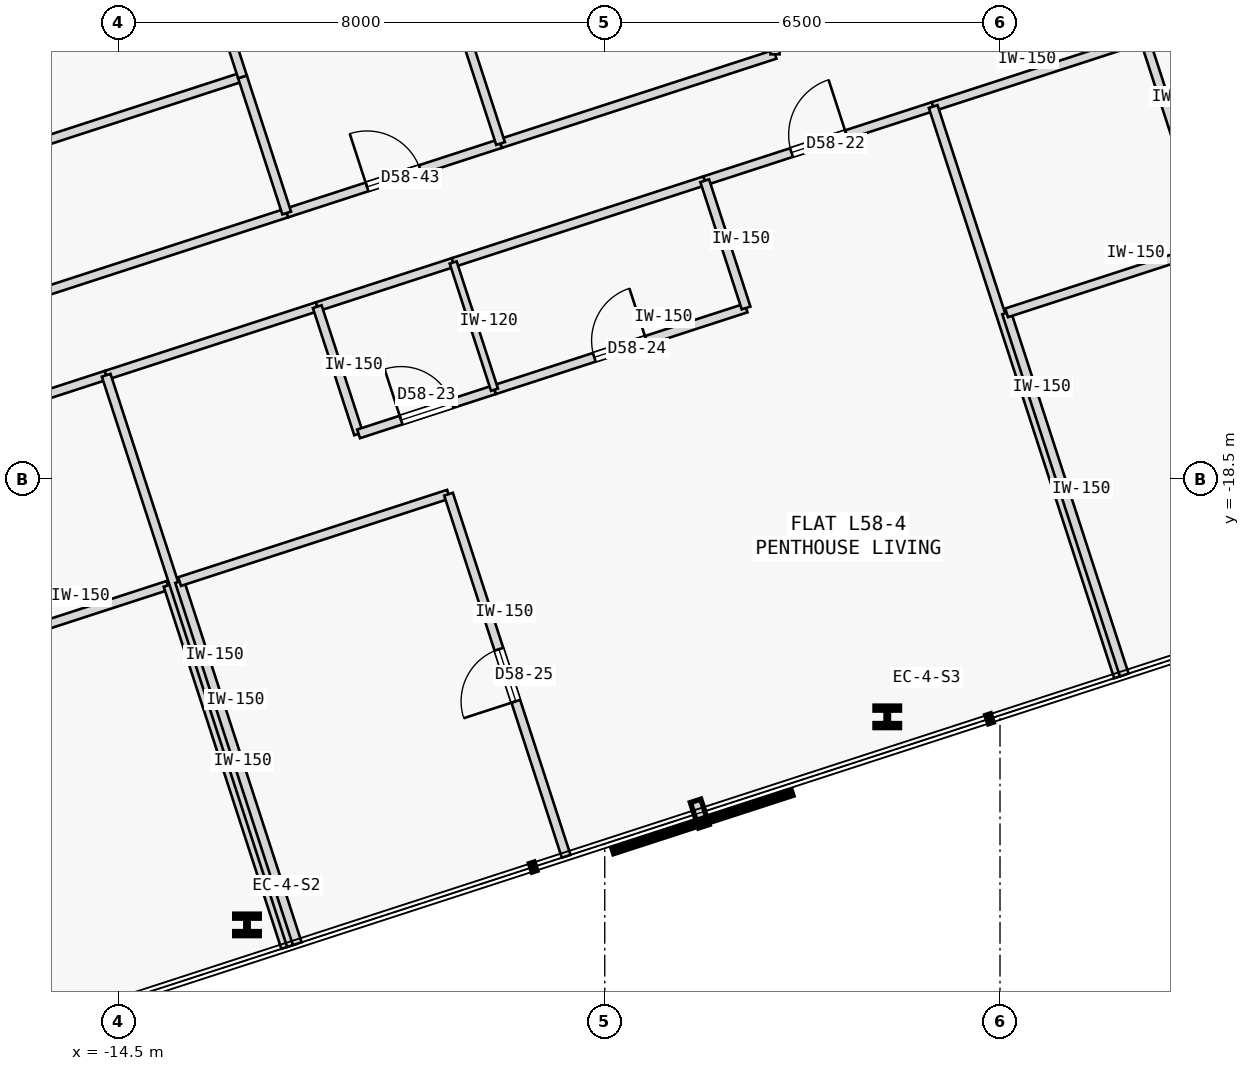
"""IFC4 building model, lengths in metres.
Left out: names, types, materials, properties, quantities, classifications, styles, units other than length and angle.
Written with IfcOpenShell. Run it as: python <this file> out.ifc"""

import sys

from ifc_helpers import new_model, si_unit, direction, frame, frame_2d, origin, origin_2d, place, context, subcontext, project, spatial, rectangle, i_section, extrude, element, fill, save


model = new_model("IFC4")
c1 = context("Model", 3, precision=1e-05, world=origin(), true_north=direction((0.0, 1.0)))
c2 = subcontext(c1, "Body", "Model", "MODEL_VIEW")
j1 = project(units=[si_unit("LENGTHUNIT", "METRE"), si_unit("PLANEANGLEUNIT", "RADIAN")], contexts=[c1])
p1 = place(None, origin())
s1 = spatial("IfcSite", under=j1, at=p1, CompositionType="ELEMENT")
p2 = place(p1, origin())
s2 = spatial("IfcBuilding", under=s1, at=p2, CompositionType="ELEMENT")
p3 = place(p2, frame((0.0, 0.0, 220.95)))
s3 = spatial("IfcBuildingStorey", under=s2, at=p3, CompositionType="ELEMENT", Elevation=220.95)
for number, where, z_axis, x_axis in (
    (1, (-12.384, -25.83, 0.0), (0.0, 0.0, 1.0), (1.0, 0.0, 0.0)),
    (2, (-1.854, -22.409, 0.0), (0.0, 0.0, 1.0), (1.0, 0.0, 0.0)),
):
    element("IfcColumn", number, at=place(p3, frame(where, z_axis=z_axis, x_axis=x_axis)), inside=s3, PredefinedType="COLUMN", context=c2, shape_type="SweptSolid", body=[
        extrude(i_section(OverallWidth=0.405, OverallDepth=0.355, WebThickness=0.042, FlangeThickness=0.068, FilletRadius=0.015, at=origin_2d()), origin(), (0.0, 0.0, 1.0), 3.35),
    ])
p4 = place(p3, frame((-18.992, -18.186, 0.0), z_axis=(0.0, 0.0, 1.0), x_axis=(0.951067846467, 0.308982121516, 0.0)))
e3 = element("IfcWall", 3, at=p4, inside=s3, PredefinedType="PARTITIONING", context=c2, shape_type="SweptSolid", body=[
    extrude(rectangle(XDim=4.514, YDim=0.15, at=frame_2d((2.257, 0.0))), origin(), (0.0, 0.0, 1.0), 3.125),
])
p5 = place(p4, frame((1.782, 0.0, 0.0)))
e4 = element("IfcOpeningElement", 4, at=p5, cuts=e3, PredefinedType="OPENING", context=c2, shape_type="SweptSolid", body=[
    extrude(rectangle(XDim=0.95, YDim=2.15, at=frame_2d((0.475, 1.075))), frame((0.0, 0.085, 0.0), z_axis=(0.0, -1.0, 0.0), x_axis=(1.0, 0.0, 0.0)), (0.0, 0.0, 1.0), 0.17),
])
p6 = place(p3, frame((-14.699, -16.791, 0.0), z_axis=(0.0, 0.0, 1.0), x_axis=(0.951050780541, 0.309034646652, 0.0)))
e5 = element("IfcWall", 5, at=p6, inside=s3, PredefinedType="PARTITIONING", context=c2, shape_type="SweptSolid", body=[
    extrude(rectangle(XDim=3.65, YDim=0.15, at=frame_2d((1.825, 0.0))), origin(), (0.0, 0.0, 1.0), 3.125),
])
p7 = place(p3, frame((-4.856, -13.593, 0.0), z_axis=(0.0, 0.0, 1.0), x_axis=(0.951054051148, 0.309024581215, 0.0)))
e6 = element("IfcWall", 6, at=p7, inside=s3, PredefinedType="PARTITIONING", context=c2, shape_type="SweptSolid", body=[
    extrude(rectangle(XDim=3.95, YDim=0.15, at=frame_2d((1.975, 0.0))), origin(), (0.0, 0.0, 1.0), 3.125),
])
p8 = place(p7, frame((1.5, 0.0, 0.0)))
e7 = element("IfcOpeningElement", 7, at=p8, cuts=e6, PredefinedType="OPENING", context=c2, shape_type="SweptSolid", body=[
    extrude(rectangle(XDim=0.95, YDim=2.15, at=frame_2d((0.475, 1.075))), frame((0.0, 0.085, 0.0), z_axis=(0.0, -1.0, 0.0), x_axis=(1.0, 0.0, 0.0)), (0.0, 0.0, 1.0), 0.17),
])
p9 = place(p3, frame((-11.228, -15.663, 0.0), z_axis=(0.0, 0.0, 1.0), x_axis=(0.951076048914, 0.308956872689, 0.0)))
e8 = element("IfcWall", 8, at=p9, inside=s3, PredefinedType="PARTITIONING", context=c2, shape_type="SweptSolid", body=[
    extrude(rectangle(XDim=2.35, YDim=0.15, at=frame_2d((1.175, 0.0))), origin(), (0.0, 0.0, 1.0), 3.125),
])
p10 = place(p3, frame((-8.993, -14.937, 0.0), z_axis=(0.0, 0.0, 1.0), x_axis=(0.951052627573, 0.309028962374, 0.0)))
e9 = element("IfcWall", 9, at=p10, inside=s3, PredefinedType="PARTITIONING", context=c2, shape_type="SweptSolid", body=[
    extrude(rectangle(XDim=4.35, YDim=0.15, at=frame_2d((2.175, 0.0))), origin(), (0.0, 0.0, 1.0), 3.125),
])
p11 = place(p3, frame((-1.099, -12.372, 0.0), z_axis=(0.0, 0.0, 1.0), x_axis=(0.951057168147, 0.309014988174, 0.0)))
e10 = element("IfcWall", 10, at=p11, inside=s3, PredefinedType="PARTITIONING", context=c2, shape_type="SweptSolid", body=[
    extrude(rectangle(XDim=3.65, YDim=0.15, at=frame_2d((1.825, 0.0))), origin(), (0.0, 0.0, 1.0), 3.125),
])
p12 = place(p3, frame((-29.45, -19.881, 0.0), z_axis=(0.0, 0.0, 1.0), x_axis=(0.95105650271, 0.309017036186, 0.0)))
e11 = element("IfcWall", 11, at=p12, inside=s3, PredefinedType="PARTITIONING", context=c2, shape_type="SweptSolid", body=[
    extrude(rectangle(XDim=18.632, YDim=0.15, at=frame_2d((9.316, 0.0))), origin(), (0.0, 0.0, 1.0), 3.125),
])
p13 = place(p12, frame((8.856, 0.0, 0.0)))
e12 = element("IfcOpeningElement", 12, at=p13, cuts=e11, PredefinedType="OPENING", context=c2, shape_type="SweptSolid", body=[
    extrude(rectangle(XDim=0.92, YDim=2.15, at=frame_2d((0.46, 1.075))), frame((0.0, 0.085, 0.0), z_axis=(0.0, -1.0, 0.0), x_axis=(1.0, 0.0, 0.0)), (0.0, 0.0, 1.0), 0.17),
])
p14 = place(p3, frame((-11.73, -14.123, 0.0), z_axis=(0.0, 0.0, 1.0), x_axis=(0.951052502763, 0.309029346483, 0.0)))
e13 = element("IfcWall", 13, at=p14, inside=s3, PredefinedType="PARTITIONING", context=c2, shape_type="SweptSolid", body=[
    extrude(rectangle(XDim=3.698, YDim=0.15, at=frame_2d((1.849, 0.0))), origin(), (0.0, 0.0, 1.0), 3.125),
])
p15 = place(p14, frame((1.389, 0.0, 0.0)))
e14 = element("IfcOpeningElement", 14, at=p15, cuts=e13, PredefinedType="OPENING", context=c2, shape_type="SweptSolid", body=[
    extrude(rectangle(XDim=0.92, YDim=2.15, at=frame_2d((0.46, 1.075))), frame((0.0, 0.085, 0.0), z_axis=(0.0, -1.0, 0.0), x_axis=(1.0, 0.0, 0.0)), (0.0, 0.0, 1.0), 0.17),
])
p16 = place(p3, frame((-8.213, -12.98, 0.0), z_axis=(0.0, 0.0, 1.0), x_axis=(0.951058260096, 0.309011627456, 0.0)))
e15 = element("IfcWall", 15, at=p16, inside=s3, PredefinedType="PARTITIONING", context=c2, shape_type="SweptSolid", body=[
    extrude(rectangle(XDim=4.746, YDim=0.15, at=frame_2d((2.373, 0.0))), origin(), (0.0, 0.0, 1.0), 3.125),
])
p17 = place(p3, frame((-3.7, -11.514, 0.0), z_axis=(0.0, 0.0, 1.0), x_axis=(-8.2572974e-05, 0.999999996591, 0.0)))
e16 = element("IfcWall", 16, at=p17, inside=s3, PredefinedType="PARTITIONING", context=c2, shape_type="SweptSolid", body=[
    extrude(rectangle(XDim=5.913, YDim=0.15, at=frame_2d((2.957, 0.0))), origin(), (0.0, 0.0, 1.0), 3.125),
])
p18 = place(p17, frame((2.497, 0.0, 0.0)))
e17 = element("IfcOpeningElement", 17, at=p18, cuts=e16, PredefinedType="OPENING", context=c2, shape_type="SweptSolid", body=[
    extrude(rectangle(XDim=0.92, YDim=2.15, at=frame_2d((0.46, 1.075))), frame((0.0, 0.085, 0.0), z_axis=(0.0, -1.0, 0.0), x_axis=(1.0, 0.0, 0.0)), (0.0, 0.0, 1.0), 0.17),
])
p19 = place(p3, frame((-18.104, -21.683, 0.0), z_axis=(0.0, 0.0, 1.0), x_axis=(0.951055286502, 0.309020779263, 0.0)))
e18 = element("IfcWall", 18, at=p19, inside=s3, PredefinedType="PARTITIONING", context=c2, shape_type="SweptSolid", body=[
    extrude(rectangle(XDim=4.65, YDim=0.15, at=frame_2d((2.325, 0.0))), origin(), (0.0, 0.0, 1.0), 3.125),
])
p20 = place(p3, frame((-11.747, -26.201, 0.0), z_axis=(0.0, 0.0, 1.0), x_axis=(-0.309013782848, 0.951057559777, 0.0)))
e19 = element("IfcWall", 19, at=p20, inside=s3, PredefinedType="PARTITIONING", context=c2, shape_type="SweptSolid", body=[
    extrude(rectangle(XDim=6.262, YDim=0.15, at=frame_2d((3.131, 0.0))), origin(), (0.0, 0.0, 1.0), 3.125),
])
p21 = place(p3, frame((-11.652, -26.17, 0.0), z_axis=(0.0, 0.0, 1.0), x_axis=(-0.308999867152, 0.951062081097, 0.0)))
e20 = element("IfcWall", 20, at=p21, inside=s3, PredefinedType="PARTITIONING", context=c2, shape_type="SweptSolid", body=[
    extrude(rectangle(XDim=9.862, YDim=0.15, at=frame_2d((4.931, 0.0))), origin(), (0.0, 0.0, 1.0), 3.125),
])
p22 = place(p3, frame((-10.548, -17.755, 0.0), z_axis=(0.0, 0.0, 1.0), x_axis=(-0.309060979314, 0.951042223598, 0.0)))
e21 = element("IfcWall", 21, at=p22, inside=s3, PredefinedType="PARTITIONING", context=c2, shape_type="SweptSolid", body=[
    extrude(rectangle(XDim=2.2, YDim=0.15, at=frame_2d((1.1, 0.0))), origin(), (0.0, 0.0, 1.0), 3.125),
])
p23 = place(p3, frame((-10.548, -17.755, 0.0), z_axis=(0.0, 0.0, 1.0), x_axis=(0.951076048914, 0.308956872689, 0.0)))
e22 = element("IfcWall", 22, at=p23, inside=s3, PredefinedType="PARTITIONING", context=c2, shape_type="SweptSolid", body=[
    extrude(rectangle(XDim=2.35, YDim=0.15, at=frame_2d((1.175, 0.0))), origin(), (0.0, 0.0, 1.0), 3.125),
])
p24 = place(p23, frame((0.735, 0.0, 0.0)))
e23 = element("IfcOpeningElement", 23, at=p24, cuts=e22, PredefinedType="OPENING", context=c2, shape_type="SweptSolid", body=[
    extrude(rectangle(XDim=0.88, YDim=2.15, at=frame_2d((0.44, 1.075))), frame((0.0, 0.085, 0.0), z_axis=(0.0, -1.0, 0.0), x_axis=(1.0, 0.0, 0.0)), (0.0, 0.0, 1.0), 0.17),
])
p25 = place(p3, frame((-8.313, -17.029, 0.0), z_axis=(0.0, 0.0, 1.0), x_axis=(0.951052627573, 0.309028962374, 0.0)))
e24 = element("IfcWall", 24, at=p25, inside=s3, PredefinedType="PARTITIONING", context=c2, shape_type="SweptSolid", body=[
    extrude(rectangle(XDim=4.35, YDim=0.15, at=frame_2d((2.175, 0.0))), origin(), (0.0, 0.0, 1.0), 3.125),
])
p26 = place(p25, frame((1.725, 0.0, 0.0)))
e25 = element("IfcOpeningElement", 25, at=p26, cuts=e24, PredefinedType="OPENING", context=c2, shape_type="SweptSolid", body=[
    extrude(rectangle(XDim=0.9, YDim=2.15, at=frame_2d((0.45, 1.075))), frame((0.0, 0.085, 0.0), z_axis=(0.0, -1.0, 0.0), x_axis=(1.0, 0.0, 0.0)), (0.0, 0.0, 1.0), 0.17),
])
p27 = place(p3, frame((-4.176, -15.685, 0.0), z_axis=(0.0, 0.0, 1.0), x_axis=(-0.309060979314, 0.951042223598, 0.0)))
e26 = element("IfcWall", 26, at=p27, inside=s3, PredefinedType="PARTITIONING", context=c2, shape_type="SweptSolid", body=[
    extrude(rectangle(XDim=2.2, YDim=0.15, at=frame_2d((1.1, 0.0))), origin(), (0.0, 0.0, 1.0), 3.125),
])
p28 = place(p3, frame((-11.557, -26.139, 0.0), z_axis=(0.0, 0.0, 1.0), x_axis=(-0.309013782848, 0.951057559777, 0.0)))
e27 = element("IfcWall", 27, at=p28, inside=s3, PredefinedType="PARTITIONING", context=c2, shape_type="SweptSolid", body=[
    extrude(rectangle(XDim=6.262, YDim=0.15, at=frame_2d((3.131, 0.0))), origin(), (0.0, 0.0, 1.0), 3.125),
])
p29 = place(p3, frame((-13.492, -20.184, 0.0), z_axis=(0.0, 0.0, 1.0), x_axis=(0.951065702951, 0.308988719326, 0.0)))
e28 = element("IfcWall", 28, at=p29, inside=s3, PredefinedType="PARTITIONING", context=c2, shape_type="SweptSolid", body=[
    extrude(rectangle(XDim=4.65, YDim=0.15, at=frame_2d((2.325, 0.0))), origin(), (0.0, 0.0, 1.0), 3.125),
])
p30 = place(p3, frame((-7.134, -24.702, 0.0), z_axis=(0.0, 0.0, 1.0), x_axis=(-0.30902524124, 0.951053836687, 0.0)))
e29 = element("IfcWall", 29, at=p30, inside=s3, PredefinedType="PARTITIONING", context=c2, shape_type="SweptSolid", body=[
    extrude(rectangle(XDim=6.262, YDim=0.15, at=frame_2d((3.131, 0.0))), origin(), (0.0, 0.0, 1.0), 3.125),
])
p31 = place(p30, frame((2.681, 0.0, 0.0)))
e30 = element("IfcOpeningElement", 30, at=p31, cuts=e29, PredefinedType="OPENING", context=c2, shape_type="SweptSolid", body=[
    extrude(rectangle(XDim=0.9, YDim=2.15, at=frame_2d((0.45, 1.075))), frame((0.0, 0.085, 0.0), z_axis=(0.0, -1.0, 0.0), x_axis=(1.0, 0.0, 0.0)), (0.0, 0.0, 1.0), 0.17),
])
p32 = place(p3, frame((1.948, -21.751, 0.0), z_axis=(0.0, 0.0, 1.0), x_axis=(-0.308999867152, 0.951062081097, 0.0)))
e31 = element("IfcWall", 31, at=p32, inside=s3, PredefinedType="PARTITIONING", context=c2, shape_type="SweptSolid", body=[
    extrude(rectangle(XDim=9.862, YDim=0.15, at=frame_2d((4.931, 0.0))), origin(), (0.0, 0.0, 1.0), 3.125),
])
p33 = place(p3, frame((-8.313, -17.029, 0.0), z_axis=(0.0, 0.0, 1.0), x_axis=(-0.309060979314, 0.951042223598, 0.0)))
e32 = element("IfcWall", 32, at=p33, inside=s3, PredefinedType="PARTITIONING", context=c2, shape_type="SweptSolid", body=[
    extrude(rectangle(XDim=2.2, YDim=0.12, at=frame_2d((1.1, 0.0))), origin(), (0.0, 0.0, 1.0), 3.125),
])
p34 = place(p3, frame((3.052, -13.336, 0.0), z_axis=(0.0, 0.0, 1.0), x_axis=(-0.308960600764, 0.951074837842, 0.0)))
e33 = element("IfcWall", 33, at=p34, inside=s3, PredefinedType="PARTITIONING", context=c2, shape_type="SweptSolid", body=[
    extrude(rectangle(XDim=2.2, YDim=0.15, at=frame_2d((1.1, 0.0))), origin(), (0.0, 0.0, 1.0), 3.125),
])
p35 = place(p3, frame((2.043, -21.72, 0.0), z_axis=(0.0, 0.0, 1.0), x_axis=(-0.309013782848, 0.951057559777, 0.0)))
e34 = element("IfcWall", 34, at=p35, inside=s3, PredefinedType="PARTITIONING", context=c2, shape_type="SweptSolid", body=[
    extrude(rectangle(XDim=6.262, YDim=0.15, at=frame_2d((3.131, 0.0))), origin(), (0.0, 0.0, 1.0), 3.125),
])
p36 = place(p3, frame((0.108, -15.765, 0.0), z_axis=(0.0, 0.0, 1.0), x_axis=(0.951065702951, 0.308988719326, 0.0)))
e35 = element("IfcWall", 35, at=p36, inside=s3, PredefinedType="PARTITIONING", context=c2, shape_type="SweptSolid", body=[
    extrude(rectangle(XDim=4.65, YDim=0.15, at=frame_2d((2.325, 0.0))), origin(), (0.0, 0.0, 1.0), 3.125),
])
p37 = place(p3, frame((-30.178, -17.642, 0.0), z_axis=(0.0, 0.0, 1.0), x_axis=(0.95105650271, 0.309017036186, 0.0)))
e36 = element("IfcWall", 36, at=p37, inside=s3, PredefinedType="PARTITIONING", context=c2, shape_type="SweptSolid", body=[
    extrude(rectangle(XDim=18.632, YDim=0.15, at=frame_2d((9.316, 0.0))), origin(), (0.0, 0.0, 1.0), 3.125),
])
p38 = place(p37, frame((8.856, 0.0, 0.0)))
e37 = element("IfcOpeningElement", 37, at=p38, cuts=e36, PredefinedType="OPENING", context=c2, shape_type="SweptSolid", body=[
    extrude(rectangle(XDim=0.92, YDim=2.15, at=frame_2d((0.46, 1.075))), frame((0.0, 0.085, 0.0), z_axis=(0.0, -1.0, 0.0), x_axis=(1.0, 0.0, 0.0)), (0.0, 0.0, 1.0), 0.17),
])
p39 = place(p3, frame((-11.73, -14.123, 0.0), z_axis=(0.0, 0.0, 1.0), x_axis=(-0.309062621189, 0.951041690035, 0.0)))
e38 = element("IfcWall", 38, at=p39, inside=s3, PredefinedType="PARTITIONING", context=c2, shape_type="SweptSolid", body=[
    extrude(rectangle(XDim=2.354, YDim=0.15, at=frame_2d((1.177, 0.0))), origin(), (0.0, 0.0, 1.0), 3.125),
])
p40 = place(p3, frame((-31.208, -14.471, 0.0), z_axis=(0.0, 0.0, 1.0), x_axis=(0.951057753948, 0.309013185244, 0.0)))
e39 = element("IfcWall", 39, at=p40, inside=s3, PredefinedType="PARTITIONING", context=c2, shape_type="SweptSolid", body=[
    extrude(rectangle(XDim=18.632, YDim=0.15, at=frame_2d((9.316, 0.0))), origin(), (0.0, 0.0, 1.0), 3.125),
])
p41 = place(p3, frame((-12.458, -11.884, 0.0), z_axis=(0.0, 0.0, 1.0), x_axis=(-0.308946982245, 0.951079261766, 0.0)))
e40 = element("IfcWall", 40, at=p41, inside=s3, PredefinedType="PARTITIONING", context=c2, shape_type="SweptSolid", body=[
    extrude(rectangle(XDim=3.334, YDim=0.15, at=frame_2d((1.667, 0.0))), origin(), (0.0, 0.0, 1.0), 3.125),
])
p42 = place(p3, frame((-8.213, -12.98, 0.0), z_axis=(0.0, 0.0, 1.0), x_axis=(-0.309017065592, 0.951056493155, 0.0)))
e41 = element("IfcWall", 41, at=p42, inside=s3, PredefinedType="PARTITIONING", context=c2, shape_type="SweptSolid", body=[
    extrude(rectangle(XDim=7.76, YDim=0.15, at=frame_2d((3.88, 0.0))), origin(), (0.0, 0.0, 1.0), 3.125),
])
p43 = place(p8, origin())
e42 = element("IfcDoor", 42, at=p43, inside=s3, OperationType="SINGLE_SWING_RIGHT", PredefinedType="DOOR", context=c2, shape_type="SweptSolid", body=[
    extrude(rectangle(XDim=0.95, YDim=2.15, at=frame_2d((0.475, 1.075))), frame((0.0, 0.025, 0.0), z_axis=(0.0, -1.0, 0.0), x_axis=(1.0, 0.0, 0.0)), (0.0, 0.0, 1.0), 0.05),
])
fill(e7, e42)
p44 = place(p24, origin())
e43 = element("IfcDoor", 43, at=p44, inside=s3, OperationType="SINGLE_SWING_LEFT", PredefinedType="DOOR", context=c2, shape_type="SweptSolid", body=[
    extrude(rectangle(XDim=0.88, YDim=2.15, at=frame_2d((0.44, 1.075))), frame((0.0, 0.025, 0.0), z_axis=(0.0, -1.0, 0.0), x_axis=(1.0, 0.0, 0.0)), (0.0, 0.0, 1.0), 0.05),
])
fill(e23, e43)
p45 = place(p26, origin())
e44 = element("IfcDoor", 44, at=p45, inside=s3, OperationType="SINGLE_SWING_RIGHT", PredefinedType="DOOR", context=c2, shape_type="SweptSolid", body=[
    extrude(rectangle(XDim=0.9, YDim=2.15, at=frame_2d((0.45, 1.075))), frame((0.0, 0.025, 0.0), z_axis=(0.0, -1.0, 0.0), x_axis=(1.0, 0.0, 0.0)), (0.0, 0.0, 1.0), 0.05),
])
fill(e25, e44)
p46 = place(p31, origin())
e45 = element("IfcDoor", 45, at=p46, inside=s3, OperationType="SINGLE_SWING_LEFT", PredefinedType="DOOR", context=c2, shape_type="SweptSolid", body=[
    extrude(rectangle(XDim=0.9, YDim=2.15, at=frame_2d((0.45, 1.075))), frame((0.0, 0.025, 0.0), z_axis=(0.0, -1.0, 0.0), x_axis=(1.0, 0.0, 0.0)), (0.0, 0.0, 1.0), 0.05),
])
fill(e30, e45)
p47 = place(p15, origin())
e46 = element("IfcDoor", 46, at=p47, inside=s3, OperationType="SINGLE_SWING_LEFT", PredefinedType="DOOR", context=c2, shape_type="SweptSolid", body=[
    extrude(rectangle(XDim=0.92, YDim=2.15, at=frame_2d((0.46, 1.075))), frame((0.0, 0.025, 0.0), z_axis=(0.0, -1.0, 0.0), x_axis=(1.0, 0.0, 0.0)), (0.0, 0.0, 1.0), 0.05),
])
fill(e14, e46)
save(model, sys.argv[1])
